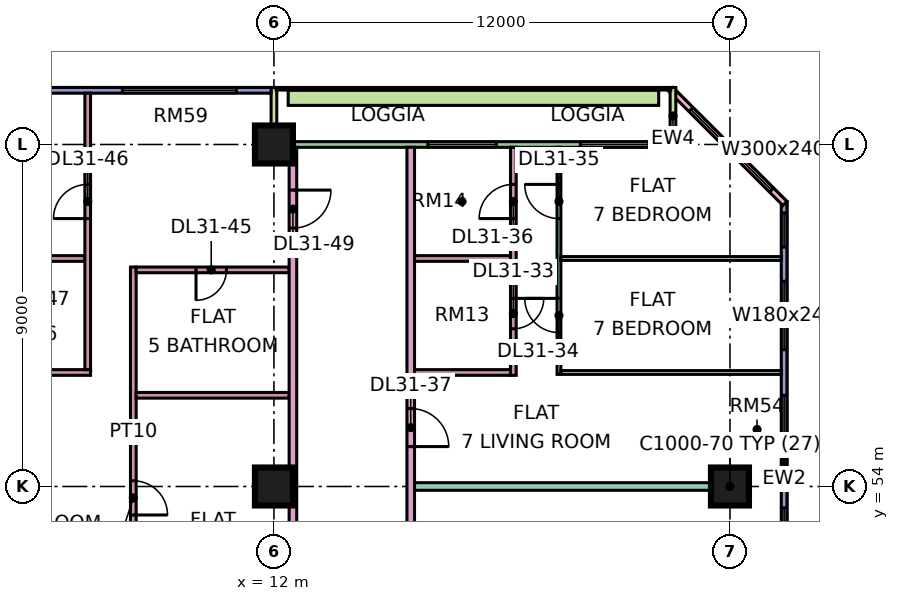
"""IFC4 building model, lengths in metres.
Left out: names, types, materials, properties, quantities, classifications, styles, units other than length and angle.
Written with IfcOpenShell. Run it as: python <this file> out.ifc"""

import sys

from ifc_helpers import new_model, si_unit, direction, frame, frame_2d, origin, origin_2d, place, context, subcontext, project, spatial, rectangle, extrude, element, fill, save


model = new_model("IFC4")
c1 = context("Model", 3, precision=1e-05, world=origin(), true_north=direction((0.0, 1.0)))
c2 = subcontext(c1, "Body", "Model", "MODEL_VIEW")
j1 = project(units=[si_unit("LENGTHUNIT", "METRE"), si_unit("PLANEANGLEUNIT", "RADIAN")], contexts=[c1])
p1 = place(None, origin())
s1 = spatial("IfcSite", under=j1, at=p1, CompositionType="ELEMENT")
p2 = place(p1, origin())
s2 = spatial("IfcBuilding", under=s1, at=p2, CompositionType="ELEMENT")
p3 = place(p2, frame((0.0, 0.0, 133.15)))
s3 = spatial("IfcBuildingStorey", under=s2, at=p3, CompositionType="ELEMENT", Elevation=133.15)
for number, where, z_axis, x_axis in (
    (1, (12.0, 54.0, 0.0), (0.0, 0.0, 1.0), (1.0, 0.0, 0.0)),
    (2, (12.0, 63.0, 0.0), (0.0, 0.0, 1.0), (1.0, 0.0, 0.0)),
    (3, (24.0, 54.0, 0.0), (0.0, 0.0, 1.0), (1.0, 0.0, 0.0)),
):
    element("IfcColumn", number, at=place(p3, frame(where, z_axis=z_axis, x_axis=x_axis)), inside=s3, PredefinedType="COLUMN", context=c2, shape_type="SweptSolid", body=[
        extrude(rectangle(XDim=1.0, YDim=1.0, at=origin_2d()), origin(), (0.0, 0.0, 1.0), 3.75),
    ])
p4 = place(p3, frame((25.425, 48.075, 0.0), z_axis=(0.0, 0.0, 1.0), x_axis=(0.0, 1.0, 0.0)))
e4 = element("IfcWall", 4, at=p4, inside=s3, PredefinedType="SOLIDWALL", context=c2, shape_type="SweptSolid", body=[
    extrude(rectangle(XDim=13.425, YDim=0.15, at=frame_2d((6.712, 0.0))), origin(), (0.0, 0.0, 1.0), 3.35),
])
p5 = place(p4, frame((0.562, 0.0, 0.45)))
e5 = element("IfcOpeningElement", 5, at=p5, cuts=e4, PredefinedType="OPENING", context=c2, shape_type="SweptSolid", body=[
    extrude(rectangle(XDim=4.8, YDim=2.4, at=frame_2d((2.4, 1.2))), frame((0.0, 0.085, 0.0), z_axis=(0.0, -1.0, 0.0), x_axis=(1.0, 0.0, 0.0)), (0.0, 0.0, 1.0), 0.17),
])
p6 = place(p4, frame((6.525, 0.0, 0.45)))
e6 = element("IfcOpeningElement", 6, at=p6, cuts=e4, PredefinedType="OPENING", context=c2, shape_type="SweptSolid", body=[
    extrude(rectangle(XDim=1.8, YDim=2.4, at=frame_2d((0.9, 1.2))), frame((0.0, 0.085, 0.0), z_axis=(0.0, -1.0, 0.0), x_axis=(1.0, 0.0, 0.0)), (0.0, 0.0, 1.0), 0.17),
])
p7 = place(p4, frame((9.525, 0.0, 0.45)))
e7 = element("IfcOpeningElement", 7, at=p7, cuts=e4, PredefinedType="OPENING", context=c2, shape_type="SweptSolid", body=[
    extrude(rectangle(XDim=1.8, YDim=2.4, at=frame_2d((0.9, 1.2))), frame((0.0, 0.085, 0.0), z_axis=(0.0, -1.0, 0.0), x_axis=(1.0, 0.0, 0.0)), (0.0, 0.0, 1.0), 0.17),
])
p8 = place(p4, frame((12.225, 0.0, 0.45)))
e8 = element("IfcOpeningElement", 8, at=p8, cuts=e4, PredefinedType="OPENING", context=c2, shape_type="SweptSolid", body=[
    extrude(rectangle(XDim=0.9, YDim=2.4, at=frame_2d((0.45, 1.2))), frame((0.0, 0.085, 0.0), z_axis=(0.0, -1.0, 0.0), x_axis=(1.0, 0.0, 0.0)), (0.0, 0.0, 1.0), 0.17),
])
p9 = place(p3, frame((25.447, 61.447, 0.0), z_axis=(0.0, 0.0, 1.0), x_axis=(-0.707106781187, 0.707106781187, 0.0)))
e9 = element("IfcWall", 9, at=p9, inside=s3, PredefinedType="SOLIDWALL", context=c2, shape_type="SweptSolid", body=[
    extrude(rectangle(XDim=4.243, YDim=0.15, at=frame_2d((2.121, 0.0))), origin(), (0.0, 0.0, 1.0), 3.35),
])
p10 = place(p9, frame((0.498, 0.0, 0.45)))
e10 = element("IfcOpeningElement", 10, at=p10, cuts=e9, PredefinedType="OPENING", context=c2, shape_type="SweptSolid", body=[
    extrude(rectangle(XDim=3.0, YDim=2.4, at=frame_2d((1.5, 1.2))), frame((0.0, 0.085, 0.0), z_axis=(0.0, -1.0, 0.0), x_axis=(1.0, 0.0, 0.0)), (0.0, 0.0, 1.0), 0.17),
])
p11 = place(p3, frame((22.425, 63.0, 0.0), z_axis=(0.0, 0.0, 1.0), x_axis=(-1.0, 0.0, 0.0)))
e11 = element("IfcWall", 11, at=p11, inside=s3, PredefinedType="SOLIDWALL", context=c2, shape_type="SweptSolid", body=[
    extrude(rectangle(XDim=10.35, YDim=0.15, at=frame_2d((5.175, 0.0))), origin(), (0.0, 0.0, 1.0), 3.35),
])
p12 = place(p11, frame((0.562, 0.0, 0.45)))
e12 = element("IfcOpeningElement", 12, at=p12, cuts=e11, PredefinedType="OPENING", context=c2, shape_type="SweptSolid", body=[
    extrude(rectangle(XDim=1.8, YDim=2.4, at=frame_2d((0.9, 1.2))), frame((0.0, 0.085, 0.0), z_axis=(0.0, -1.0, 0.0), x_axis=(1.0, 0.0, 0.0)), (0.0, 0.0, 1.0), 0.17),
])
p13 = place(p11, frame((4.575, 0.0, 0.45)))
e13 = element("IfcOpeningElement", 13, at=p13, cuts=e11, PredefinedType="OPENING", context=c2, shape_type="SweptSolid", body=[
    extrude(rectangle(XDim=1.8, YDim=2.4, at=frame_2d((0.9, 1.2))), frame((0.0, 0.085, 0.0), z_axis=(0.0, -1.0, 0.0), x_axis=(1.0, 0.0, 0.0)), (0.0, 0.0, 1.0), 0.17),
])
for number, where, z_axis, x_axis in (
    (14, (22.5, 64.5, 0.0), (0.0, 0.0, 1.0), (0.0, -1.0, 0.0)),
    (15, (12.0, 64.5, 0.0), (0.0, 0.0, 1.0), (0.0, -1.0, 0.0)),
):
    element("IfcWall", number, at=place(p3, frame(where, z_axis=z_axis, x_axis=x_axis)), inside=s3, PredefinedType="SOLIDWALL", context=c2, shape_type="SweptSolid", body=[
        extrude(rectangle(XDim=1.5, YDim=0.15, at=frame_2d((0.75, 0.0))), origin(), (0.0, 0.0, 1.0), 3.35),
    ])
p14 = place(p3, frame((11.925, 64.425, 0.0), z_axis=(0.0, 0.0, 1.0), x_axis=(-1.0, 0.0, 0.0)))
e16 = element("IfcWall", 16, at=p14, inside=s3, PredefinedType="SOLIDWALL", context=c2, shape_type="SweptSolid", body=[
    extrude(rectangle(XDim=10.425, YDim=0.15, at=frame_2d((5.212, 0.0))), origin(), (0.0, 0.0, 1.0), 3.35),
])
p15 = place(p14, frame((0.913, 0.0, 0.45)))
e17 = element("IfcOpeningElement", 17, at=p15, cuts=e16, PredefinedType="OPENING", context=c2, shape_type="SweptSolid", body=[
    extrude(rectangle(XDim=3.0, YDim=2.4, at=frame_2d((1.5, 1.2))), frame((0.0, 0.085, 0.0), z_axis=(0.0, -1.0, 0.0), x_axis=(1.0, 0.0, 0.0)), (0.0, 0.0, 1.0), 0.17),
])
p16 = place(p14, frame((6.125, 0.0, 0.45)))
e18 = element("IfcOpeningElement", 18, at=p16, cuts=e16, PredefinedType="OPENING", context=c2, shape_type="SweptSolid", body=[
    extrude(rectangle(XDim=3.0, YDim=2.4, at=frame_2d((1.5, 1.2))), frame((0.0, 0.085, 0.0), z_axis=(0.0, -1.0, 0.0), x_axis=(1.0, 0.0, 0.0)), (0.0, 0.0, 1.0), 0.17),
])
p17 = place(p3, frame((22.125, 64.229, 0.0), z_axis=(0.0, 0.0, 1.0), x_axis=(-1.0, 0.0, 0.0)))
e19 = element("IfcWall", 19, at=p17, inside=s3, PredefinedType="SOLIDWALL", context=c2, shape_type="SweptSolid", body=[
    extrude(rectangle(XDim=9.75, YDim=0.4, at=frame_2d((4.875, 0.0))), origin(), (0.0, 0.0, 1.0), 0.7),
])
p18 = place(p3, frame((-1.35, 57.0, 0.0), z_axis=(0.0, 0.0, 1.0), x_axis=(1.0, 0.0, 0.0)))
e20 = element("IfcWall", 20, at=p18, inside=s3, PredefinedType="PARTITIONING", context=c2, shape_type="SweptSolid", body=[
    extrude(rectangle(XDim=8.525, YDim=0.15, at=frame_2d((4.263, 0.0))), origin(), (0.0, 0.0, 1.0), 3.35),
])
p19 = place(p3, frame((4.175, 60.0, 0.0), z_axis=(0.0, 0.0, 1.0), x_axis=(1.0, 0.0, 0.0)))
e21 = element("IfcWall", 21, at=p19, inside=s3, PredefinedType="PARTITIONING", context=c2, shape_type="SweptSolid", body=[
    extrude(rectangle(XDim=2.85, YDim=0.15, at=frame_2d((1.425, 0.0))), origin(), (0.0, 0.0, 1.0), 3.35),
])
p20 = place(p19, frame((0.975, 0.0, 0.0)))
e22 = element("IfcOpeningElement", 22, at=p20, cuts=e21, PredefinedType="OPENING", context=c2, shape_type="SweptSolid", body=[
    extrude(rectangle(XDim=0.8, YDim=2.1, at=frame_2d((0.4, 1.05))), frame((0.0, 0.085, 0.0), z_axis=(0.0, -1.0, 0.0), x_axis=(1.0, 0.0, 0.0)), (0.0, 0.0, 1.0), 0.17),
])
p21 = place(p3, frame((7.1, 57.075, 0.0), z_axis=(0.0, 0.0, 1.0), x_axis=(0.0, 1.0, 0.0)))
e23 = element("IfcWall", 23, at=p21, inside=s3, PredefinedType="PARTITIONING", context=c2, shape_type="SweptSolid", body=[
    extrude(rectangle(XDim=7.275, YDim=0.15, at=frame_2d((3.638, 0.0))), origin(), (0.0, 0.0, 1.0), 3.35),
])
p22 = place(p21, frame((3.975, 0.0, 0.0)))
e24 = element("IfcOpeningElement", 24, at=p22, cuts=e23, PredefinedType="OPENING", context=c2, shape_type="SweptSolid", body=[
    extrude(rectangle(XDim=0.9, YDim=2.1, at=frame_2d((0.45, 1.05))), frame((0.0, 0.085, 0.0), z_axis=(0.0, -1.0, 0.0), x_axis=(1.0, 0.0, 0.0)), (0.0, 0.0, 1.0), 0.17),
])
p23 = place(p3, frame((8.3, 51.1, 0.0), z_axis=(0.0, 0.0, 1.0), x_axis=(0.0, 1.0, 0.0)))
e25 = element("IfcWall", 25, at=p23, inside=s3, PredefinedType="PARTITIONING", context=c2, shape_type="SweptSolid", body=[
    extrude(rectangle(XDim=8.675, YDim=0.15, at=frame_2d((4.337, 0.0))), origin(), (0.0, 0.0, 1.0), 3.35),
])
p24 = place(p23, frame((2.15, 0.0, 0.0)))
e26 = element("IfcOpeningElement", 26, at=p24, cuts=e25, PredefinedType="OPENING", context=c2, shape_type="SweptSolid", body=[
    extrude(rectangle(XDim=0.9, YDim=2.1, at=frame_2d((0.45, 1.05))), frame((0.0, 0.085, 0.0), z_axis=(0.0, -1.0, 0.0), x_axis=(1.0, 0.0, 0.0)), (0.0, 0.0, 1.0), 0.17),
])
p25 = place(p3, frame((8.375, 56.4, 0.0), z_axis=(0.0, 0.0, 1.0), x_axis=(1.0, 0.0, 0.0)))
e27 = element("IfcWall", 27, at=p25, inside=s3, PredefinedType="PARTITIONING", context=c2, shape_type="SweptSolid", body=[
    extrude(rectangle(XDim=4.025, YDim=0.15, at=frame_2d((2.012, 0.0))), origin(), (0.0, 0.0, 1.0), 3.35),
])
p26 = place(p3, frame((8.375, 59.7, 0.0), z_axis=(0.0, 0.0, 1.0), x_axis=(1.0, 0.0, 0.0)))
e28 = element("IfcWall", 28, at=p26, inside=s3, PredefinedType="PARTITIONING", context=c2, shape_type="SweptSolid", body=[
    extrude(rectangle(XDim=4.025, YDim=0.15, at=frame_2d((2.012, 0.0))), origin(), (0.0, 0.0, 1.0), 3.35),
])
p27 = place(p26, frame((1.575, 0.0, 0.0)))
e29 = element("IfcOpeningElement", 29, at=p27, cuts=e28, PredefinedType="OPENING", context=c2, shape_type="SweptSolid", body=[
    extrude(rectangle(XDim=0.8, YDim=2.1, at=frame_2d((0.4, 1.05))), frame((0.0, 0.085, 0.0), z_axis=(0.0, -1.0, 0.0), x_axis=(1.0, 0.0, 0.0)), (0.0, 0.0, 1.0), 0.17),
])
p28 = place(p3, frame((12.5, 20.0, 0.0), z_axis=(0.0, 0.0, 1.0), x_axis=(0.0, 1.0, 0.0)))
e30 = element("IfcWall", 30, at=p28, inside=s3, PredefinedType="PARTITIONING", context=c2, shape_type="SweptSolid", body=[
    extrude(rectangle(XDim=42.926, YDim=0.2, at=frame_2d((21.463, 0.0))), origin(), (0.0, 0.0, 1.0), 3.35),
])
p29 = place(p28, frame((17.25, 0.0, 0.0)))
e31 = element("IfcOpeningElement", 31, at=p29, cuts=e30, PredefinedType="OPENING", context=c2, shape_type="SweptSolid", body=[
    extrude(rectangle(XDim=1.0, YDim=2.1, at=frame_2d((0.5, 1.05))), frame((0.0, 0.11, 0.0), z_axis=(0.0, -1.0, 0.0), x_axis=(1.0, 0.0, 0.0)), (0.0, 0.0, 1.0), 0.22),
])
p30 = place(p28, frame((40.8, 0.0, 0.0)))
e32 = element("IfcOpeningElement", 32, at=p30, cuts=e30, PredefinedType="OPENING", context=c2, shape_type="SweptSolid", body=[
    extrude(rectangle(XDim=1.0, YDim=2.1, at=frame_2d((0.5, 1.05))), frame((0.0, 0.11, 0.0), z_axis=(0.0, -1.0, 0.0), x_axis=(1.0, 0.0, 0.0)), (0.0, 0.0, 1.0), 0.22),
])
p31 = place(p28, frame((0.6, 0.0, 0.0)))
e33 = element("IfcOpeningElement", 33, at=p31, cuts=e30, PredefinedType="OPENING", context=c2, shape_type="SweptSolid", body=[
    extrude(rectangle(XDim=1.2, YDim=2.1, at=frame_2d((0.6, 1.05))), frame((0.0, 0.11, 0.0), z_axis=(0.0, -1.0, 0.0), x_axis=(1.0, 0.0, 0.0)), (0.0, 0.0, 1.0), 0.22),
])
p32 = place(p28, frame((13.65, 0.0, 0.0)))
e34 = element("IfcOpeningElement", 34, at=p32, cuts=e30, PredefinedType="OPENING", context=c2, shape_type="SweptSolid", body=[
    extrude(rectangle(XDim=1.0, YDim=2.1, at=frame_2d((0.5, 1.05))), frame((0.0, 0.11, 0.0), z_axis=(0.0, -1.0, 0.0), x_axis=(1.0, 0.0, 0.0)), (0.0, 0.0, 1.0), 0.22),
])
p33 = place(p3, frame((15.6, 51.225, 0.0), z_axis=(0.0, 0.0, 1.0), x_axis=(0.0, 1.0, 0.0)))
e35 = element("IfcWall", 35, at=p33, inside=s3, PredefinedType="PARTITIONING", context=c2, shape_type="SweptSolid", body=[
    extrude(rectangle(XDim=11.701, YDim=0.2, at=frame_2d((5.851, 0.0))), origin(), (0.0, 0.0, 1.0), 3.35),
])
p34 = place(p33, frame((3.825, 0.0, 0.0)))
e36 = element("IfcOpeningElement", 36, at=p34, cuts=e35, PredefinedType="OPENING", context=c2, shape_type="SweptSolid", body=[
    extrude(rectangle(XDim=1.0, YDim=2.1, at=frame_2d((0.5, 1.05))), frame((0.0, 0.11, 0.0), z_axis=(0.0, -1.0, 0.0), x_axis=(1.0, 0.0, 0.0)), (0.0, 0.0, 1.0), 0.22),
])
p35 = place(p3, frame((15.7, 54.0, 0.0), z_axis=(0.0, 0.0, 1.0), x_axis=(1.0, 0.0, 0.0)))
e37 = element("IfcWall", 37, at=p35, inside=s3, PredefinedType="PARTITIONING", context=c2, shape_type="SweptSolid", body=[
    extrude(rectangle(XDim=8.3, YDim=0.2, at=frame_2d((4.15, 0.0))), origin(), (0.0, 0.0, 1.0), 3.35),
])
for number, where, z_axis, x_axis in (
    (38, (15.7, 57.0, 0.0), (0.0, 0.0, 1.0), (1.0, 0.0, 0.0)),
    (39, (15.7, 60.0, 0.0), (0.0, 0.0, 1.0), (1.0, 0.0, 0.0)),
):
    element("IfcWall", number, at=place(p3, frame(where, z_axis=z_axis, x_axis=x_axis)), inside=s3, PredefinedType="PARTITIONING", context=c2, shape_type="SweptSolid", body=[
        extrude(rectangle(XDim=2.525, YDim=0.15, at=frame_2d((1.263, 0.0))), origin(), (0.0, 0.0, 1.0), 3.35),
    ])
p36 = place(p3, frame((18.3, 56.925, 0.0), z_axis=(0.0, 0.0, 1.0), x_axis=(0.0, 1.0, 0.0)))
e40 = element("IfcWall", 40, at=p36, inside=s3, PredefinedType="PARTITIONING", context=c2, shape_type="SweptSolid", body=[
    extrude(rectangle(XDim=6.001, YDim=0.15, at=frame_2d((3.0, 0.0))), origin(), (0.0, 0.0, 1.0), 3.35),
])
p37 = place(p36, frame((1.225, 0.0, 0.0)))
e41 = element("IfcOpeningElement", 41, at=p37, cuts=e40, PredefinedType="OPENING", context=c2, shape_type="SweptSolid", body=[
    extrude(rectangle(XDim=0.8, YDim=2.1, at=frame_2d((0.4, 1.05))), frame((0.0, 0.085, 0.0), z_axis=(0.0, -1.0, 0.0), x_axis=(1.0, 0.0, 0.0)), (0.0, 0.0, 1.0), 0.17),
])
p38 = place(p36, frame((4.125, 0.0, 0.0)))
e42 = element("IfcOpeningElement", 42, at=p38, cuts=e40, PredefinedType="OPENING", context=c2, shape_type="SweptSolid", body=[
    extrude(rectangle(XDim=0.9, YDim=2.1, at=frame_2d((0.45, 1.05))), frame((0.0, 0.085, 0.0), z_axis=(0.0, -1.0, 0.0), x_axis=(1.0, 0.0, 0.0)), (0.0, 0.0, 1.0), 0.17),
])
p39 = place(p3, frame((19.5, 56.95, 0.0), z_axis=(0.0, 0.0, 1.0), x_axis=(0.0, 1.0, 0.0)))
e43 = element("IfcWall", 43, at=p39, inside=s3, PredefinedType="PARTITIONING", context=c2, shape_type="SweptSolid", body=[
    extrude(rectangle(XDim=5.976, YDim=0.1, at=frame_2d((2.988, 0.0))), origin(), (0.0, 0.0, 1.0), 3.35),
])
p40 = place(p39, frame((1.1, 0.0, 0.0)))
e44 = element("IfcOpeningElement", 44, at=p40, cuts=e43, PredefinedType="OPENING", context=c2, shape_type="SweptSolid", body=[
    extrude(rectangle(XDim=0.9, YDim=2.1, at=frame_2d((0.45, 1.05))), frame((0.0, 0.06, 0.0), z_axis=(0.0, -1.0, 0.0), x_axis=(1.0, 0.0, 0.0)), (0.0, 0.0, 1.0), 0.12),
])
p41 = place(p39, frame((4.1, 0.0, 0.0)))
e45 = element("IfcOpeningElement", 45, at=p41, cuts=e43, PredefinedType="OPENING", context=c2, shape_type="SweptSolid", body=[
    extrude(rectangle(XDim=0.9, YDim=2.1, at=frame_2d((0.45, 1.05))), frame((0.0, 0.06, 0.0), z_axis=(0.0, -1.0, 0.0), x_axis=(1.0, 0.0, 0.0)), (0.0, 0.0, 1.0), 0.12),
])
p42 = place(p3, frame((19.55, 57.0, 0.0), z_axis=(0.0, 0.0, 1.0), x_axis=(1.0, 0.0, 0.0)))
e46 = element("IfcWall", 46, at=p42, inside=s3, PredefinedType="PARTITIONING", context=c2, shape_type="SweptSolid", body=[
    extrude(rectangle(XDim=5.8, YDim=0.1, at=frame_2d((2.9, 0.0))), origin(), (0.0, 0.0, 1.0), 3.35),
])
p43 = place(p3, frame((19.55, 60.0, 0.0), z_axis=(0.0, 0.0, 1.0), x_axis=(1.0, 0.0, 0.0)))
e47 = element("IfcWall", 47, at=p43, inside=s3, PredefinedType="PARTITIONING", context=c2, shape_type="SweptSolid", body=[
    extrude(rectangle(XDim=5.801, YDim=0.1, at=frame_2d((2.9, 0.0))), origin(), (0.0, 0.0, 1.0), 3.35),
])
p44 = place(p5, origin())
e48 = element("IfcWindow", 48, at=p44, inside=s3, PartitioningType="SINGLE_PANEL", PredefinedType="WINDOW", context=c2, shape_type="SweptSolid", body=[
    extrude(rectangle(XDim=4.8, YDim=2.4, at=frame_2d((2.4, 1.2))), frame((0.0, 0.03, 0.0), z_axis=(0.0, -1.0, 0.0), x_axis=(1.0, 0.0, 0.0)), (0.0, 0.0, 1.0), 0.06),
])
fill(e5, e48)
p45 = place(p6, origin())
e49 = element("IfcWindow", 49, at=p45, inside=s3, PartitioningType="SINGLE_PANEL", PredefinedType="WINDOW", context=c2, shape_type="SweptSolid", body=[
    extrude(rectangle(XDim=1.8, YDim=2.4, at=frame_2d((0.9, 1.2))), frame((0.0, 0.03, 0.0), z_axis=(0.0, -1.0, 0.0), x_axis=(1.0, 0.0, 0.0)), (0.0, 0.0, 1.0), 0.06),
])
fill(e6, e49)
p46 = place(p7, origin())
e50 = element("IfcWindow", 50, at=p46, inside=s3, PartitioningType="SINGLE_PANEL", PredefinedType="WINDOW", context=c2, shape_type="SweptSolid", body=[
    extrude(rectangle(XDim=1.8, YDim=2.4, at=frame_2d((0.9, 1.2))), frame((0.0, 0.03, 0.0), z_axis=(0.0, -1.0, 0.0), x_axis=(1.0, 0.0, 0.0)), (0.0, 0.0, 1.0), 0.06),
])
fill(e7, e50)
p47 = place(p8, origin())
e51 = element("IfcWindow", 51, at=p47, inside=s3, PartitioningType="SINGLE_PANEL", PredefinedType="WINDOW", context=c2, shape_type="SweptSolid", body=[
    extrude(rectangle(XDim=0.9, YDim=2.4, at=frame_2d((0.45, 1.2))), frame((0.0, 0.03, 0.0), z_axis=(0.0, -1.0, 0.0), x_axis=(1.0, 0.0, 0.0)), (0.0, 0.0, 1.0), 0.06),
])
fill(e8, e51)
p48 = place(p10, origin())
e52 = element("IfcWindow", 52, at=p48, inside=s3, PartitioningType="SINGLE_PANEL", PredefinedType="WINDOW", context=c2, shape_type="SweptSolid", body=[
    extrude(rectangle(XDim=3.0, YDim=2.4, at=frame_2d((1.5, 1.2))), frame((0.0, 0.03, 0.0), z_axis=(0.0, -1.0, 0.0), x_axis=(1.0, 0.0, 0.0)), (0.0, 0.0, 1.0), 0.06),
])
fill(e10, e52)
p49 = place(p12, origin())
e53 = element("IfcWindow", 53, at=p49, inside=s3, PartitioningType="SINGLE_PANEL", PredefinedType="WINDOW", context=c2, shape_type="SweptSolid", body=[
    extrude(rectangle(XDim=1.8, YDim=2.4, at=frame_2d((0.9, 1.2))), frame((0.0, 0.03, 0.0), z_axis=(0.0, -1.0, 0.0), x_axis=(1.0, 0.0, 0.0)), (0.0, 0.0, 1.0), 0.06),
])
fill(e12, e53)
p50 = place(p13, origin())
e54 = element("IfcWindow", 54, at=p50, inside=s3, PartitioningType="SINGLE_PANEL", PredefinedType="WINDOW", context=c2, shape_type="SweptSolid", body=[
    extrude(rectangle(XDim=1.8, YDim=2.4, at=frame_2d((0.9, 1.2))), frame((0.0, 0.03, 0.0), z_axis=(0.0, -1.0, 0.0), x_axis=(1.0, 0.0, 0.0)), (0.0, 0.0, 1.0), 0.06),
])
fill(e13, e54)
p51 = place(p15, origin())
e55 = element("IfcWindow", 55, at=p51, inside=s3, PartitioningType="SINGLE_PANEL", PredefinedType="WINDOW", context=c2, shape_type="SweptSolid", body=[
    extrude(rectangle(XDim=3.0, YDim=2.4, at=frame_2d((1.5, 1.2))), frame((0.0, 0.03, 0.0), z_axis=(0.0, -1.0, 0.0), x_axis=(1.0, 0.0, 0.0)), (0.0, 0.0, 1.0), 0.06),
])
fill(e17, e55)
p52 = place(p37, origin())
e56 = element("IfcDoor", 56, at=p52, inside=s3, OperationType="SINGLE_SWING_RIGHT", PredefinedType="DOOR", context=c2, shape_type="SweptSolid", body=[
    extrude(rectangle(XDim=0.8, YDim=2.1, at=frame_2d((0.4, 1.05))), frame((0.0, 0.025, 0.0), z_axis=(0.0, -1.0, 0.0), x_axis=(1.0, 0.0, 0.0)), (0.0, 0.0, 1.0), 0.05),
])
fill(e41, e56)
p53 = place(p40, frame((0.9, 0.0, 0.0), z_axis=(0.0, 0.0, 1.0), x_axis=(-1.0, 0.0, 0.0)))
e57 = element("IfcDoor", 57, at=p53, inside=s3, OperationType="SINGLE_SWING_RIGHT", PredefinedType="DOOR", context=c2, shape_type="SweptSolid", body=[
    extrude(rectangle(XDim=0.9, YDim=2.1, at=frame_2d((0.45, 1.05))), frame((0.0, 0.025, 0.0), z_axis=(0.0, -1.0, 0.0), x_axis=(1.0, 0.0, 0.0)), (0.0, 0.0, 1.0), 0.05),
])
fill(e44, e57)
p54 = place(p41, frame((0.9, 0.0, 0.0), z_axis=(0.0, 0.0, 1.0), x_axis=(-1.0, 0.0, 0.0)))
e58 = element("IfcDoor", 58, at=p54, inside=s3, OperationType="SINGLE_SWING_RIGHT", PredefinedType="DOOR", context=c2, shape_type="SweptSolid", body=[
    extrude(rectangle(XDim=0.9, YDim=2.1, at=frame_2d((0.45, 1.05))), frame((0.0, 0.025, 0.0), z_axis=(0.0, -1.0, 0.0), x_axis=(1.0, 0.0, 0.0)), (0.0, 0.0, 1.0), 0.05),
])
fill(e45, e58)
p55 = place(p38, origin())
e59 = element("IfcDoor", 59, at=p55, inside=s3, OperationType="SINGLE_SWING_LEFT", PredefinedType="DOOR", context=c2, shape_type="SweptSolid", body=[
    extrude(rectangle(XDim=0.9, YDim=2.1, at=frame_2d((0.45, 1.05))), frame((0.0, 0.025, 0.0), z_axis=(0.0, -1.0, 0.0), x_axis=(1.0, 0.0, 0.0)), (0.0, 0.0, 1.0), 0.05),
])
fill(e42, e59)
p56 = place(p34, frame((1.0, 0.0, 0.0), z_axis=(0.0, 0.0, 1.0), x_axis=(-1.0, 0.0, 0.0)))
e60 = element("IfcDoor", 60, at=p56, inside=s3, OperationType="SINGLE_SWING_LEFT", PredefinedType="DOOR", context=c2, shape_type="SweptSolid", body=[
    extrude(rectangle(XDim=1.0, YDim=2.1, at=frame_2d((0.5, 1.05))), frame((0.0, 0.025, 0.0), z_axis=(0.0, -1.0, 0.0), x_axis=(1.0, 0.0, 0.0)), (0.0, 0.0, 1.0), 0.05),
])
fill(e36, e60)
p57 = place(p27, frame((0.8, 0.0, 0.0), z_axis=(0.0, 0.0, 1.0), x_axis=(-1.0, 0.0, 0.0)))
e61 = element("IfcDoor", 61, at=p57, inside=s3, OperationType="SINGLE_SWING_LEFT", PredefinedType="DOOR", context=c2, shape_type="SweptSolid", body=[
    extrude(rectangle(XDim=0.8, YDim=2.1, at=frame_2d((0.4, 1.05))), frame((0.0, 0.025, 0.0), z_axis=(0.0, -1.0, 0.0), x_axis=(1.0, 0.0, 0.0)), (0.0, 0.0, 1.0), 0.05),
])
fill(e29, e61)
p58 = place(p22, origin())
e62 = element("IfcDoor", 62, at=p58, inside=s3, OperationType="SINGLE_SWING_LEFT", PredefinedType="DOOR", context=c2, shape_type="SweptSolid", body=[
    extrude(rectangle(XDim=0.9, YDim=2.1, at=frame_2d((0.45, 1.05))), frame((0.0, 0.025, 0.0), z_axis=(0.0, -1.0, 0.0), x_axis=(1.0, 0.0, 0.0)), (0.0, 0.0, 1.0), 0.05),
])
fill(e24, e62)
p59 = place(p24, frame((0.9, 0.0, 0.0), z_axis=(0.0, 0.0, 1.0), x_axis=(-1.0, 0.0, 0.0)))
e63 = element("IfcDoor", 63, at=p59, inside=s3, OperationType="SINGLE_SWING_LEFT", PredefinedType="DOOR", context=c2, shape_type="SweptSolid", body=[
    extrude(rectangle(XDim=0.9, YDim=2.1, at=frame_2d((0.45, 1.05))), frame((0.0, 0.025, 0.0), z_axis=(0.0, -1.0, 0.0), x_axis=(1.0, 0.0, 0.0)), (0.0, 0.0, 1.0), 0.05),
])
fill(e26, e63)
p60 = place(p30, origin())
e64 = element("IfcDoor", 64, at=p60, inside=s3, OperationType="SINGLE_SWING_RIGHT", PredefinedType="DOOR", context=c2, shape_type="SweptSolid", body=[
    extrude(rectangle(XDim=1.0, YDim=2.1, at=frame_2d((0.5, 1.05))), frame((0.0, 0.025, 0.0), z_axis=(0.0, -1.0, 0.0), x_axis=(1.0, 0.0, 0.0)), (0.0, 0.0, 1.0), 0.05),
])
fill(e32, e64)
save(model, sys.argv[1])
